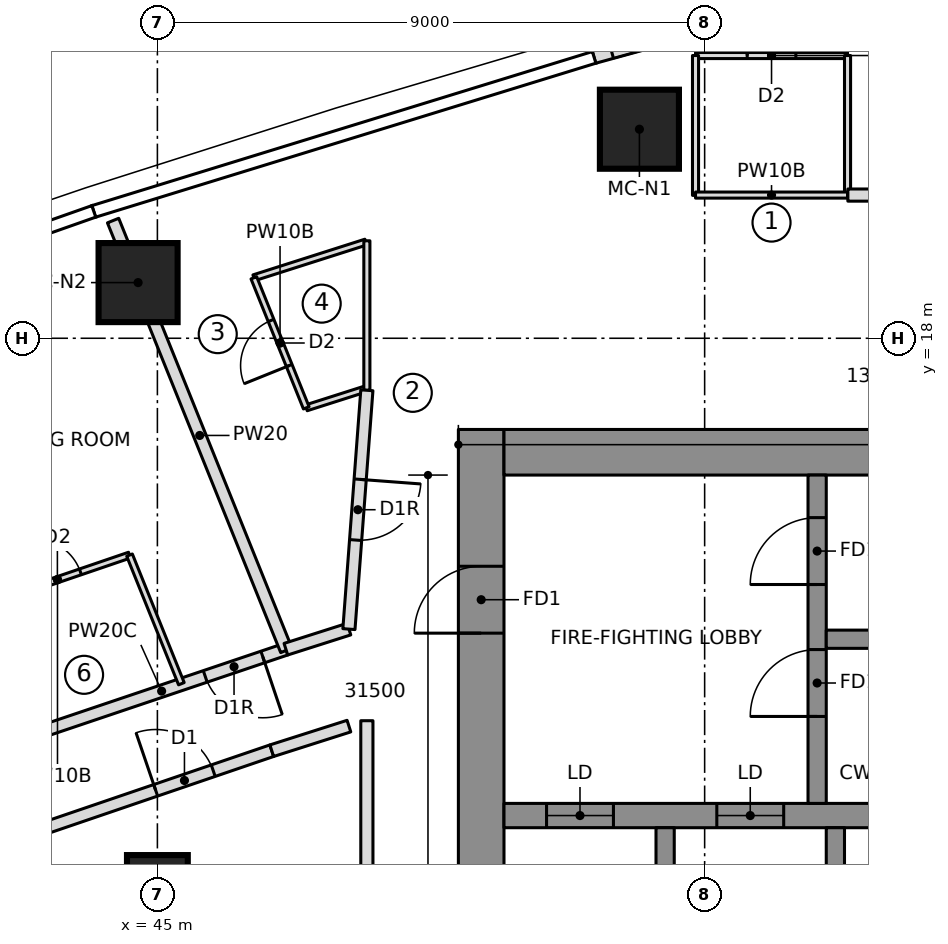
"""IFC4 building model, lengths in metres.
Left out: names, types, materials, properties, quantities, classifications, styles, units other than length and angle.
Written with IfcOpenShell. Run it as: python <this file> out.ifc"""

import sys

from ifc_helpers import new_model, si_unit, direction, frame, frame_2d, origin, origin_2d, place, context, subcontext, project, spatial, polyline, rectangle, outline, extrude, element, fill, save


model = new_model("IFC4")
c1 = context("Model", 3, precision=1e-05, world=origin(), true_north=direction((0.0, 1.0)))
c2 = subcontext(c1, "Body", "Model", "MODEL_VIEW")
j1 = project(units=[si_unit("LENGTHUNIT", "METRE"), si_unit("PLANEANGLEUNIT", "RADIAN")], contexts=[c1])
p1 = place(None, origin())
s1 = spatial("IfcSite", under=j1, at=p1, CompositionType="ELEMENT")
p2 = place(p1, origin())
s2 = spatial("IfcBuilding", under=s1, at=p2, CompositionType="ELEMENT")
p3 = place(p2, frame((0.0, 0.0, 207.45)))
s3 = spatial("IfcBuildingStorey", under=s2, at=p3, CompositionType="ELEMENT", Elevation=207.45)
p4 = place(p3, frame((50.325, 6.65, 0.0), z_axis=(0.0, 0.0, 1.0), x_axis=(0.0, 1.0, 0.0)))
e1 = element("IfcWall", 1, at=p4, inside=s3, PredefinedType="SHEAR", context=c2, shape_type="SweptSolid", body=[
    extrude(rectangle(XDim=9.85, YDim=0.75, at=frame_2d((4.925, 0.0))), origin(), (0.0, 0.0, 1.0), 3.55),
])
p5 = place(p4, frame((6.5, 0.0, 0.0)))
e2 = element("IfcOpeningElement", 2, at=p5, cuts=e1, PredefinedType="OPENING", context=c2, shape_type="SweptSolid", body=[
    extrude(rectangle(XDim=1.1, YDim=2.1, at=frame_2d((0.55, 1.05))), frame((0.0, 0.385, 0.0), z_axis=(0.0, -1.0, 0.0), x_axis=(1.0, 0.0, 0.0)), (0.0, 0.0, 1.0), 0.77),
])
p6 = place(p3, frame((50.7, 16.125, 0.0), z_axis=(0.0, 0.0, 1.0), x_axis=(1.0, 0.0, 0.0)))
e3 = element("IfcWall", 3, at=p6, inside=s3, PredefinedType="SHEAR", context=c2, shape_type="SweptSolid", body=[
    extrude(rectangle(XDim=13.77, YDim=0.75, at=frame_2d((6.885, 0.0))), origin(), (0.0, 0.0, 1.0), 3.55),
])
p7 = place(p3, frame((50.7, 10.15, 0.0), z_axis=(0.0, 0.0, 1.0), x_axis=(1.0, 0.0, 0.0)))
e4 = element("IfcWall", 4, at=p7, inside=s3, PredefinedType="SHEAR", context=c2, shape_type="SweptSolid", body=[
    extrude(rectangle(XDim=13.02, YDim=0.4, at=frame_2d((6.51, 0.0))), origin(), (0.0, 0.0, 1.0), 3.55),
])
p8 = place(p7, frame((0.7, 0.0, 0.0)))
e5 = element("IfcOpeningElement", 5, at=p8, cuts=e4, PredefinedType="OPENING", context=c2, shape_type="SweptSolid", body=[
    extrude(rectangle(XDim=1.1, YDim=2.1, at=frame_2d((0.55, 1.05))), frame((0.0, 0.21, 0.0), z_axis=(0.0, -1.0, 0.0), x_axis=(1.0, 0.0, 0.0)), (0.0, 0.0, 1.0), 0.42),
])
p9 = place(p7, frame((3.5, 0.0, 0.0)))
e6 = element("IfcOpeningElement", 6, at=p9, cuts=e4, PredefinedType="OPENING", context=c2, shape_type="SweptSolid", body=[
    extrude(rectangle(XDim=1.1, YDim=2.1, at=frame_2d((0.55, 1.05))), frame((0.0, 0.21, 0.0), z_axis=(0.0, -1.0, 0.0), x_axis=(1.0, 0.0, 0.0)), (0.0, 0.0, 1.0), 0.42),
])
for number, where, z_axis, x_axis in (
    (7, (53.35, 6.95, 0.0), (0.0, 0.0, 1.0), (0.0, 1.0, 0.0)),
    (8, (56.15, 6.95, 0.0), (0.0, 0.0, 1.0), (0.0, 1.0, 0.0)),
):
    element("IfcWall", number, at=place(p3, frame(where, z_axis=z_axis, x_axis=x_axis)), inside=s3, PredefinedType="SHEAR", context=c2, shape_type="SweptSolid", body=[
        extrude(rectangle(XDim=3.0, YDim=0.3, at=frame_2d((1.5, 0.0))), origin(), (0.0, 0.0, 1.0), 3.55),
    ])
p10 = place(p3, frame((55.85, 10.35, 0.0), z_axis=(0.0, 0.0, 1.0), x_axis=(0.0, 1.0, 0.0)))
e9 = element("IfcWall", 9, at=p10, inside=s3, PredefinedType="SHEAR", context=c2, shape_type="SweptSolid", body=[
    extrude(rectangle(XDim=5.4, YDim=0.3, at=frame_2d((2.7, 0.0))), origin(), (0.0, 0.0, 1.0), 3.55),
])
p11 = place(p10, frame((1.43, 0.0, 0.0)))
e10 = element("IfcOpeningElement", 10, at=p11, cuts=e9, PredefinedType="OPENING", context=c2, shape_type="SweptSolid", body=[
    extrude(rectangle(XDim=1.1, YDim=2.1, at=frame_2d((0.55, 1.05))), frame((0.0, 0.16, 0.0), z_axis=(0.0, -1.0, 0.0), x_axis=(1.0, 0.0, 0.0)), (0.0, 0.0, 1.0), 0.32),
])
p12 = place(p10, frame((3.6, 0.0, 0.0)))
e11 = element("IfcOpeningElement", 11, at=p12, cuts=e9, PredefinedType="OPENING", context=c2, shape_type="SweptSolid", body=[
    extrude(rectangle(XDim=1.1, YDim=2.1, at=frame_2d((0.55, 1.05))), frame((0.0, 0.16, 0.0), z_axis=(0.0, -1.0, 0.0), x_axis=(1.0, 0.0, 0.0)), (0.0, 0.0, 1.0), 0.32),
])
p13 = place(p3, frame((56.0, 13.05, 0.0), z_axis=(0.0, 0.0, 1.0), x_axis=(1.0, 0.0, 0.0)))
e12 = element("IfcWall", 12, at=p13, inside=s3, PredefinedType="SHEAR", context=c2, shape_type="SweptSolid", body=[
    extrude(rectangle(XDim=7.72, YDim=0.3, at=frame_2d((3.86, 0.0))), origin(), (0.0, 0.0, 1.0), 3.55),
])
for number, where, z_axis, x_axis in (
    (13, (52.927, 21.438, 0.0), (0.0, 0.0, 1.0), (1.0, 0.0, 0.0)),
    (14, (44.683, 18.916, 0.0), (0.0, 0.0, 1.0), (1.0, 0.0, 0.0)),
):
    element("IfcColumn", number, at=place(p3, frame(where, z_axis=z_axis, x_axis=x_axis)), inside=s3, PredefinedType="COLUMN", context=c2, shape_type="SweptSolid", body=[
        extrude(rectangle(XDim=1.3, YDim=1.3, at=origin_2d()), origin(), (0.0, 0.0, 1.0), 3.55),
    ])
p14 = place(p3, frame((45.0, 9.0, 0.0), z_axis=(0.0, 0.0, 1.0), x_axis=(1.0, 0.0, 0.0)))
e15 = element("IfcColumn", 15, at=p14, inside=s3, PredefinedType="COLUMN", context=c2, shape_type="SweptSolid", body=[
    extrude(rectangle(XDim=1.0, YDim=1.0, at=origin_2d()), origin(), (0.0, 0.0, 1.0), 3.55),
])
p15 = place(p3, frame((56.308, 23.858, 0.0), z_axis=(0.0, 0.0, 1.0), x_axis=(-0.964205755089, -0.265155165617, 0.0)))
e16 = element("IfcWall", 16, at=p15, inside=s3, PredefinedType="NOTDEFINED", context=c2, shape_type="SweptSolid", body=[
    extrude(outline(polyline([(-0.03, -0.2), (4.307, -0.2), (4.307, 0.2), (0.03, 0.2), (-0.03, -0.2)])), origin(), (0.0, 0.0, 1.0), 3.25),
])
p16 = place(p15, frame((0.303, 0.0, 0.9)))
e17 = element("IfcOpeningElement", 17, at=p16, cuts=e16, PredefinedType="OPENING", context=c2, shape_type="SweptSolid", body=[
    extrude(rectangle(XDim=1.2, YDim=1.8, at=frame_2d((0.6, 0.9))), frame((0.0, 0.21, 0.0), z_axis=(0.0, -1.0, 0.0), x_axis=(1.0, 0.0, 0.0)), (0.0, 0.0, 1.0), 0.42),
])
p17 = place(p15, frame((1.704, 0.0, 0.9)))
e18 = element("IfcOpeningElement", 18, at=p17, cuts=e16, PredefinedType="OPENING", context=c2, shape_type="SweptSolid", body=[
    extrude(rectangle(XDim=2.3, YDim=1.8, at=frame_2d((1.15, 0.9))), frame((0.0, 0.21, 0.0), z_axis=(0.0, -1.0, 0.0), x_axis=(1.0, 0.0, 0.0)), (0.0, 0.0, 1.0), 0.42),
])
p18 = place(p3, frame((53.85, 22.65, 0.0), z_axis=(0.0, 0.0, 1.0), x_axis=(1.0, 0.0, 0.0)))
e19 = element("IfcWall", 19, at=p18, inside=s3, PredefinedType="PARTITIONING", context=c2, shape_type="SweptSolid", body=[
    extrude(rectangle(XDim=2.5, YDim=0.1, at=frame_2d((1.25, 0.0))), origin(), (0.0, 0.0, 1.0), 3.15),
])
p19 = place(p18, frame((0.85, 0.0, 0.0)))
e20 = element("IfcOpeningElement", 20, at=p19, cuts=e19, PredefinedType="OPENING", context=c2, shape_type="SweptSolid", body=[
    extrude(rectangle(XDim=0.8, YDim=2.1, at=frame_2d((0.4, 1.05))), frame((0.0, 0.06, 0.0), z_axis=(0.0, -1.0, 0.0), x_axis=(1.0, 0.0, 0.0)), (0.0, 0.0, 1.0), 0.12),
])
for number, where, z_axis, x_axis in (
    (21, (56.35, 22.65, 0.0), (0.0, 0.0, 1.0), (0.0, -1.0, 0.0)),
    (22, (53.85, 20.35, 0.0), (0.0, 0.0, 1.0), (0.0, 1.0, 0.0)),
):
    element("IfcWall", number, at=place(p3, frame(where, z_axis=z_axis, x_axis=x_axis)), inside=s3, PredefinedType="PARTITIONING", context=c2, shape_type="SweptSolid", body=[
        extrude(rectangle(XDim=2.3, YDim=0.1, at=frame_2d((1.15, 0.0))), origin(), (0.0, 0.0, 1.0), 3.15),
    ])
p20 = place(p3, frame((47.113, 12.886, 0.0), z_axis=(0.0, 0.0, 1.0), x_axis=(-0.947550995841, -0.319604615549, 0.0)))
e23 = element("IfcWall", 23, at=p20, inside=s3, PredefinedType="PARTITIONING", context=c2, shape_type="SweptSolid", body=[
    extrude(rectangle(XDim=4.314, YDim=0.2, at=frame_2d((2.157, 0.0))), origin(), (0.0, 0.0, 1.0), 3.15),
])
p21 = place(p20, frame((0.4, 0.0, 0.0)))
e24 = element("IfcOpeningElement", 24, at=p21, cuts=e23, PredefinedType="OPENING", context=c2, shape_type="SweptSolid", body=[
    extrude(rectangle(XDim=1.0, YDim=2.1, at=frame_2d((0.5, 1.05))), frame((0.0, 0.11, 0.0), z_axis=(0.0, -1.0, 0.0), x_axis=(1.0, 0.0, 0.0)), (0.0, 0.0, 1.0), 0.22),
])
p22 = place(p3, frame((42.172, 13.625, 0.0), z_axis=(0.0, 0.0, 1.0), x_axis=(0.946406575113, 0.322977699822, 0.0)))
e25 = element("IfcWall", 25, at=p22, inside=s3, PredefinedType="PARTITIONING", context=c2, shape_type="SweptSolid", body=[
    extrude(rectangle(XDim=2.504, YDim=0.1, at=frame_2d((1.252, 0.0))), origin(), (0.0, 0.0, 1.0), 3.15),
])
p23 = place(p22, frame((0.85, 0.0, 0.0)))
e26 = element("IfcOpeningElement", 26, at=p23, cuts=e25, PredefinedType="OPENING", context=c2, shape_type="SweptSolid", body=[
    extrude(rectangle(XDim=0.8, YDim=2.1, at=frame_2d((0.4, 1.05))), frame((0.0, 0.06, 0.0), z_axis=(0.0, -1.0, 0.0), x_axis=(1.0, 0.0, 0.0)), (0.0, 0.0, 1.0), 0.12),
])
p24 = place(p3, frame((44.542, 14.434, 0.0), z_axis=(0.0, 0.0, 1.0), x_axis=(0.373917841166, -0.927461831052, 0.0)))
e27 = element("IfcWall", 27, at=p24, inside=s3, PredefinedType="PARTITIONING", context=c2, shape_type="SweptSolid", body=[
    extrude(rectangle(XDim=2.281, YDim=0.1, at=frame_2d((1.14, 0.0))), origin(), (0.0, 0.0, 1.0), 3.15),
])
p25 = place(p3, frame((47.121, 12.867, 0.0), z_axis=(0.0, 0.0, 1.0), x_axis=(-0.373907892596, 0.92746584188, 0.0)))
e28 = element("IfcWall", 28, at=p25, inside=s3, PredefinedType="PARTITIONING", context=c2, shape_type="SweptSolid", body=[
    extrude(rectangle(XDim=7.621, YDim=0.2, at=frame_2d((3.811, 0.0))), origin(), (0.0, 0.0, 1.0), 3.15),
])
p26 = place(p3, frame((46.586, 18.994, 0.0), z_axis=(0.0, 0.0, 1.0), x_axis=(0.952696570315, 0.303923090451, 0.0)))
e29 = element("IfcWall", 29, at=p26, inside=s3, PredefinedType="PARTITIONING", context=c2, shape_type="SweptSolid", body=[
    extrude(rectangle(XDim=1.933, YDim=0.1, at=frame_2d((0.966, 0.0))), origin(), (0.0, 0.0, 1.0), 3.15),
])
p27 = place(p3, frame((48.427, 17.167, 0.0), z_axis=(0.0, 0.0, 1.0), x_axis=(-0.952763220029, -0.303714086864, 0.0)))
e30 = element("IfcWall", 30, at=p27, inside=s3, PredefinedType="PARTITIONING", context=c2, shape_type="SweptSolid", body=[
    extrude(rectangle(XDim=1.027, YDim=0.1, at=frame_2d((0.513, 0.0))), origin(), (0.0, 0.0, 1.0), 3.15),
])
p28 = place(p3, frame((47.448, 16.855, 0.0), z_axis=(0.0, 0.0, 1.0), x_axis=(-0.373817051068, 0.927502459474, 0.0)))
e31 = element("IfcWall", 31, at=p28, inside=s3, PredefinedType="PARTITIONING", context=c2, shape_type="SweptSolid", body=[
    extrude(rectangle(XDim=2.306, YDim=0.1, at=frame_2d((1.153, 0.0))), origin(), (0.0, 0.0, 1.0), 3.15),
])
p29 = place(p28, frame((0.75, 0.0, 0.0)))
e32 = element("IfcOpeningElement", 32, at=p29, cuts=e31, PredefinedType="OPENING", context=c2, shape_type="SweptSolid", body=[
    extrude(rectangle(XDim=0.8, YDim=2.1, at=frame_2d((0.4, 1.05))), frame((0.0, 0.06, 0.0), z_axis=(0.0, -1.0, 0.0), x_axis=(1.0, 0.0, 0.0)), (0.0, 0.0, 1.0), 0.12),
])
p30 = place(p3, frame((42.984, 9.887, 0.0), z_axis=(0.0, 0.0, 1.0), x_axis=(0.946436071896, 0.322891253852, 0.0)))
e33 = element("IfcWall", 33, at=p30, inside=s3, PredefinedType="PARTITIONING", context=c2, shape_type="SweptSolid", body=[
    extrude(rectangle(XDim=4.117, YDim=0.2, at=frame_2d((2.059, 0.0))), origin(), (0.0, 0.0, 1.0), 3.15),
])
p31 = place(p30, frame((2.1, 0.0, 0.0)))
e34 = element("IfcOpeningElement", 34, at=p31, cuts=e33, PredefinedType="OPENING", context=c2, shape_type="SweptSolid", body=[
    extrude(rectangle(XDim=1.0, YDim=2.1, at=frame_2d((0.5, 1.05))), frame((0.0, 0.11, 0.0), z_axis=(0.0, -1.0, 0.0), x_axis=(1.0, 0.0, 0.0)), (0.0, 0.0, 1.0), 0.22),
])
p32 = place(p3, frame((63.709, 20.355, 0.0), z_axis=(0.0, 0.0, 1.0), x_axis=(-1.0, 0.0, 0.0)))
e35 = element("IfcWall", 35, at=p32, inside=s3, PredefinedType="PARTITIONING", context=c2, shape_type="SweptSolid", body=[
    extrude(rectangle(XDim=7.354, YDim=0.2, at=frame_2d((3.677, 0.0))), origin(), (0.0, 0.0, 1.0), 3.15),
])
p33 = place(p32, frame((3.231, 0.0, 0.0)))
e36 = element("IfcOpeningElement", 36, at=p33, cuts=e35, PredefinedType="OPENING", context=c2, shape_type="SweptSolid", body=[
    extrude(rectangle(XDim=1.5, YDim=2.1, at=frame_2d((0.75, 1.05))), frame((0.0, 0.11, 0.0), z_axis=(0.0, -1.0, 0.0), x_axis=(1.0, 0.0, 0.0)), (0.0, 0.0, 1.0), 0.22),
])
p34 = place(p3, frame((56.35, 20.355, 0.0), z_axis=(0.0, 0.0, 1.0), x_axis=(-1.0, 0.0, 0.0)))
e37 = element("IfcWall", 37, at=p34, inside=s3, PredefinedType="PARTITIONING", context=c2, shape_type="SweptSolid", body=[
    extrude(rectangle(XDim=2.5, YDim=0.1, at=frame_2d((1.25, 0.0))), origin(), (0.0, 0.0, 1.0), 3.15),
])
p35 = place(p3, frame((48.445, 19.603, 0.0), z_axis=(0.0, 0.0, 1.0), x_axis=(0.0, -1.0, 0.0)))
e38 = element("IfcWall", 38, at=p35, inside=s3, PredefinedType="PARTITIONING", context=c2, shape_type="SweptSolid", body=[
    extrude(rectangle(XDim=2.459, YDim=0.1, at=frame_2d((1.229, 0.0))), origin(), (0.0, 0.0, 1.0), 3.15),
])
p36 = place(p3, frame((48.15, 13.217, 0.0), z_axis=(0.0, 0.0, 1.0), x_axis=(-0.952731090451, -0.303814860215, 0.0)))
e39 = element("IfcWall", 39, at=p36, inside=s3, PredefinedType="PARTITIONING", context=c2, shape_type="SweptSolid", body=[
    extrude(rectangle(XDim=1.088, YDim=0.2, at=frame_2d((0.544, 0.0))), origin(), (0.0, 0.0, 1.0), 3.15),
])
p37 = place(p3, frame((46.881, 11.217, 0.0), z_axis=(0.0, 0.0, 1.0), x_axis=(0.952761948983, 0.303718074157, 0.0)))
e40 = element("IfcWall", 40, at=p37, inside=s3, PredefinedType="PARTITIONING", context=c2, shape_type="SweptSolid", body=[
    extrude(rectangle(XDim=1.332, YDim=0.2, at=frame_2d((0.666, 0.0))), origin(), (0.0, 0.0, 1.0), 3.15),
])
p38 = place(p3, frame((48.445, 17.145, 0.0), z_axis=(0.0, 0.0, 1.0), x_axis=(-0.074933243819, -0.997188552366, 0.0)))
e41 = element("IfcWall", 41, at=p38, inside=s3, PredefinedType="PARTITIONING", context=c2, shape_type="SweptSolid", body=[
    extrude(rectangle(XDim=3.939, YDim=0.2, at=frame_2d((1.969, 0.0))), origin(), (0.0, 0.0, 1.0), 3.15),
])
p39 = place(p38, frame((1.47, 0.0, 0.0)))
e42 = element("IfcOpeningElement", 42, at=p39, cuts=e41, PredefinedType="OPENING", context=c2, shape_type="SweptSolid", body=[
    extrude(rectangle(XDim=1.0, YDim=2.1, at=frame_2d((0.5, 1.05))), frame((0.0, 0.11, 0.0), z_axis=(0.0, -1.0, 0.0), x_axis=(1.0, 0.0, 0.0)), (0.0, 0.0, 1.0), 0.22),
])
p40 = place(p3, frame((48.445, 11.71, 0.0), z_axis=(0.0, 0.0, 1.0), x_axis=(0.0, -1.0, 0.0)))
e43 = element("IfcWall", 43, at=p40, inside=s3, PredefinedType="PARTITIONING", context=c2, shape_type="SweptSolid", body=[
    extrude(rectangle(XDim=23.42, YDim=0.2, at=frame_2d((11.71, 0.0))), origin(), (0.0, 0.0, 1.0), 3.15),
])
p41 = place(p17, origin())
e44 = element("IfcWindow", 44, at=p41, inside=s3, PartitioningType="SINGLE_PANEL", PredefinedType="WINDOW", context=c2, shape_type="SweptSolid", body=[
    extrude(rectangle(XDim=2.3, YDim=1.8, at=frame_2d((1.15, 0.9))), frame((0.0, 0.17, 0.0), z_axis=(0.0, -1.0, 0.0), x_axis=(1.0, 0.0, 0.0)), (0.0, 0.0, 1.0), 0.06),
])
fill(e18, e44)
p42 = place(p19, origin())
e45 = element("IfcDoor", 45, at=p42, inside=s3, OperationType="SINGLE_SWING_LEFT", PredefinedType="DOOR", context=c2, shape_type="SweptSolid", body=[
    extrude(rectangle(XDim=0.8, YDim=2.1, at=frame_2d((0.4, 1.05))), frame((0.0, 0.025, 0.0), z_axis=(0.0, -1.0, 0.0), x_axis=(1.0, 0.0, 0.0)), (0.0, 0.0, 1.0), 0.05),
])
fill(e20, e45)
p43 = place(p23, origin())
e46 = element("IfcDoor", 46, at=p43, inside=s3, OperationType="SINGLE_SWING_LEFT", PredefinedType="DOOR", context=c2, shape_type="SweptSolid", body=[
    extrude(rectangle(XDim=0.8, YDim=2.1, at=frame_2d((0.4, 1.05))), frame((0.0, 0.025, 0.0), z_axis=(0.0, -1.0, 0.0), x_axis=(1.0, 0.0, 0.0)), (0.0, 0.0, 1.0), 0.05),
])
fill(e26, e46)
p44 = place(p21, origin())
e47 = element("IfcDoor", 47, at=p44, inside=s3, OperationType="SINGLE_SWING_RIGHT", PredefinedType="DOOR", context=c2, shape_type="SweptSolid", body=[
    extrude(rectangle(XDim=1.0, YDim=2.1, at=frame_2d((0.5, 1.05))), frame((0.0, 0.025, 0.0), z_axis=(0.0, -1.0, 0.0), x_axis=(1.0, 0.0, 0.0)), (0.0, 0.0, 1.0), 0.05),
])
fill(e24, e47)
p45 = place(p29, origin())
e48 = element("IfcDoor", 48, at=p45, inside=s3, OperationType="SINGLE_SWING_LEFT", PredefinedType="DOOR", context=c2, shape_type="SweptSolid", body=[
    extrude(rectangle(XDim=0.8, YDim=2.1, at=frame_2d((0.4, 1.05))), frame((0.0, 0.025, 0.0), z_axis=(0.0, -1.0, 0.0), x_axis=(1.0, 0.0, 0.0)), (0.0, 0.0, 1.0), 0.05),
])
fill(e32, e48)
p46 = place(p31, origin())
e49 = element("IfcDoor", 49, at=p46, inside=s3, OperationType="SINGLE_SWING_LEFT", PredefinedType="DOOR", context=c2, shape_type="SweptSolid", body=[
    extrude(rectangle(XDim=1.0, YDim=2.1, at=frame_2d((0.5, 1.05))), frame((0.0, 0.025, 0.0), z_axis=(0.0, -1.0, 0.0), x_axis=(1.0, 0.0, 0.0)), (0.0, 0.0, 1.0), 0.05),
])
fill(e34, e49)
p47 = place(p39, origin())
e50 = element("IfcDoor", 50, at=p47, inside=s3, OperationType="SINGLE_SWING_RIGHT", PredefinedType="DOOR", context=c2, shape_type="SweptSolid", body=[
    extrude(rectangle(XDim=1.0, YDim=2.1, at=frame_2d((0.5, 1.05))), frame((0.0, 0.025, 0.0), z_axis=(0.0, -1.0, 0.0), x_axis=(1.0, 0.0, 0.0)), (0.0, 0.0, 1.0), 0.05),
])
fill(e42, e50)
p48 = place(p8, origin())
e51 = element("IfcDoor", 51, at=p48, inside=s3, OperationType="DOUBLE_DOOR_SLIDING", PredefinedType="DOOR", context=c2, shape_type="SweptSolid", body=[
    extrude(rectangle(XDim=1.1, YDim=2.1, at=frame_2d((0.55, 1.05))), frame((0.0, 0.025, 0.0), z_axis=(0.0, -1.0, 0.0), x_axis=(1.0, 0.0, 0.0)), (0.0, 0.0, 1.0), 0.05),
])
fill(e5, e51)
p49 = place(p9, origin())
e52 = element("IfcDoor", 52, at=p49, inside=s3, OperationType="DOUBLE_DOOR_SLIDING", PredefinedType="DOOR", context=c2, shape_type="SweptSolid", body=[
    extrude(rectangle(XDim=1.1, YDim=2.1, at=frame_2d((0.55, 1.05))), frame((0.0, 0.025, 0.0), z_axis=(0.0, -1.0, 0.0), x_axis=(1.0, 0.0, 0.0)), (0.0, 0.0, 1.0), 0.05),
])
fill(e6, e52)
p50 = place(p11, origin())
e53 = element("IfcDoor", 53, at=p50, inside=s3, OperationType="SINGLE_SWING_RIGHT", PredefinedType="DOOR", context=c2, shape_type="SweptSolid", body=[
    extrude(rectangle(XDim=1.1, YDim=2.1, at=frame_2d((0.55, 1.05))), frame((0.0, 0.025, 0.0), z_axis=(0.0, -1.0, 0.0), x_axis=(1.0, 0.0, 0.0)), (0.0, 0.0, 1.0), 0.05),
])
fill(e10, e53)
p51 = place(p12, origin())
e54 = element("IfcDoor", 54, at=p51, inside=s3, OperationType="SINGLE_SWING_RIGHT", PredefinedType="DOOR", context=c2, shape_type="SweptSolid", body=[
    extrude(rectangle(XDim=1.1, YDim=2.1, at=frame_2d((0.55, 1.05))), frame((0.0, 0.025, 0.0), z_axis=(0.0, -1.0, 0.0), x_axis=(1.0, 0.0, 0.0)), (0.0, 0.0, 1.0), 0.05),
])
fill(e11, e54)
p52 = place(p5, origin())
e55 = element("IfcDoor", 55, at=p52, inside=s3, OperationType="SINGLE_SWING_RIGHT", PredefinedType="DOOR", context=c2, shape_type="SweptSolid", body=[
    extrude(rectangle(XDim=1.1, YDim=2.1, at=frame_2d((0.55, 1.05))), frame((0.0, 0.025, 0.0), z_axis=(0.0, -1.0, 0.0), x_axis=(1.0, 0.0, 0.0)), (0.0, 0.0, 1.0), 0.05),
])
fill(e2, e55)
save(model, sys.argv[1])
